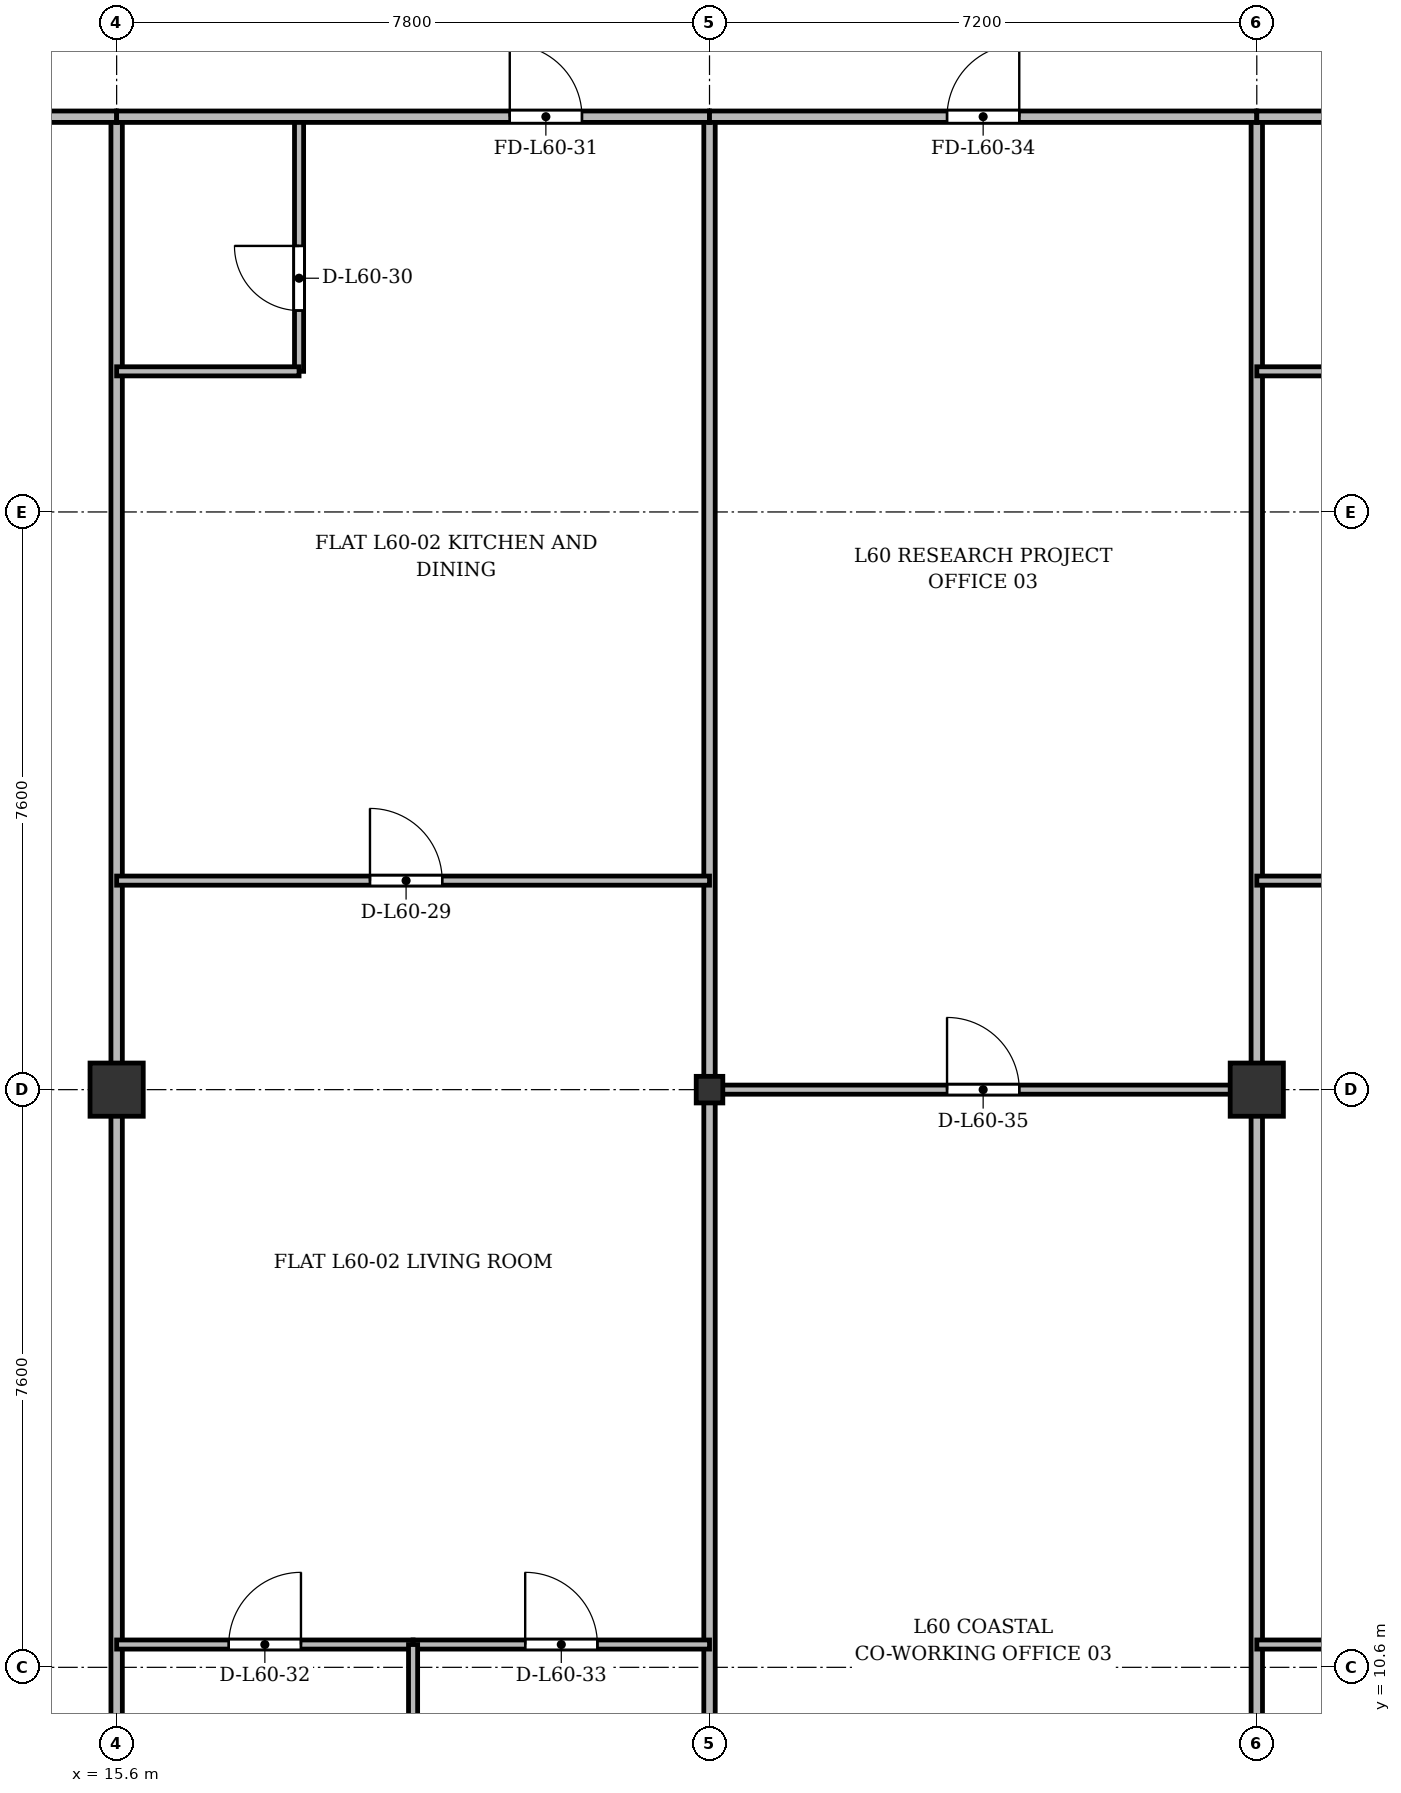
"""IFC4 building model, lengths in metres.
Left out: names, types, materials, properties, quantities, classifications, styles, units other than length and angle.
Written with IfcOpenShell. Run it as: python <this file> out.ifc"""

import sys

from ifc_helpers import new_model, si_unit, direction, frame, frame_2d, origin, origin_2d, place, context, subcontext, project, spatial, rectangle, i_section, extrude, source, transform, mapped, element, fill, save


model = new_model("IFC4")
c1 = context("Model", 3, precision=1e-05, world=origin(), true_north=direction((0.0, 1.0)))
c2 = subcontext(c1, "Body", "Model", "MODEL_VIEW")
j1 = project(units=[si_unit("LENGTHUNIT", "METRE"), si_unit("PLANEANGLEUNIT", "RADIAN")], contexts=[c1])
p1 = place(None, origin())
s1 = spatial("IfcSite", under=j1, at=p1, CompositionType="ELEMENT")
p2 = place(p1, origin())
s2 = spatial("IfcBuilding", under=s1, at=p2, CompositionType="ELEMENT")
p3 = place(p2, frame((0.0, 0.0, 230.1)))
s3 = spatial("IfcBuildingStorey", under=s2, at=p3, CompositionType="ELEMENT", Elevation=230.1)
m1 = source(origin(), c2, "Body", "SweptSolid", [
    extrude(rectangle(XDim=0.7, YDim=0.7, at=origin_2d()), origin(), (0.0, 0.0, 1.0), 3.6),
])
p4 = place(p3, frame((15.6, 18.2, 0.0), z_axis=(0.0, 0.0, 1.0), x_axis=(1.0, 0.0, 0.0)))
e1 = element("IfcColumn", 1, at=p4, inside=s3, PredefinedType="COLUMN", context=c2, shape_type="MappedRepresentation", body=[
    mapped(m1, transform((0.0, 0.0, 0.0), x_axis=(1.0, 0.0, 0.0), y_axis=(0.0, 1.0, 0.0), z_axis=(0.0, 0.0, 1.0), scale=1.0)),
])
m2 = source(origin(), c2, "Body", "SweptSolid", [
    extrude(i_section(OverallWidth=0.35, OverallDepth=0.35, WebThickness=0.018, FlangeThickness=0.028, at=origin_2d()), origin(), (0.0, 0.0, 1.0), 3.6),
])
p5 = place(p3, frame((23.4, 18.2, 0.0), z_axis=(0.0, 0.0, 1.0), x_axis=(1.0, 0.0, 0.0)))
e2 = element("IfcColumn", 2, at=p5, inside=s3, PredefinedType="COLUMN", context=c2, shape_type="MappedRepresentation", body=[
    mapped(m2, transform((0.0, 0.0, 0.0), x_axis=(1.0, 0.0, 0.0), y_axis=(0.0, 1.0, 0.0), z_axis=(0.0, 0.0, 1.0), scale=1.0)),
])
p6 = place(p3, frame((30.6, 18.2, 0.0), z_axis=(0.0, 0.0, 1.0), x_axis=(1.0, 0.0, 0.0)))
e3 = element("IfcColumn", 3, at=p6, inside=s3, PredefinedType="COLUMN", context=c2, shape_type="MappedRepresentation", body=[
    mapped(m1, transform((0.0, 0.0, 0.0), x_axis=(1.0, 0.0, 0.0), y_axis=(0.0, 1.0, 0.0), z_axis=(0.0, 0.0, 1.0), scale=1.0)),
])
for number, where, z_axis, x_axis in (
    (4, (15.6, 3.625, 0.0), (0.0, 0.0, 1.0), (0.0, 1.0, 0.0)),
    (5, (23.4, 3.625, 0.0), (0.0, 0.0, 1.0), (0.0, 1.0, 0.0)),
    (6, (30.6, 3.625, 0.0), (0.0, 0.0, 1.0), (0.0, 1.0, 0.0)),
):
    element("IfcWall", number, at=place(p3, frame(where, z_axis=z_axis, x_axis=x_axis)), inside=s3, PredefinedType="PARTITIONING", context=c2, shape_type="SweptSolid", body=[
        extrude(rectangle(XDim=27.375, YDim=0.15, at=frame_2d((13.688, 0.0))), origin(), (0.0, 0.0, 1.0), 2.86),
    ])
p7 = place(p3, frame((8.225, 31.0, 0.0), z_axis=(0.0, 0.0, 1.0), x_axis=(1.0, 0.0, 0.0)))
e7 = element("IfcWall", 7, at=p7, inside=s3, PredefinedType="PARTITIONING", context=c2, shape_type="SweptSolid", body=[
    extrude(rectangle(XDim=7.375, YDim=0.15, at=frame_2d((3.688, 0.0))), origin(), (0.0, 0.0, 1.0), 2.86),
])
p8 = place(p7, frame((2.795, 0.0, 0.0)))
e8 = element("IfcOpeningElement", 8, at=p8, cuts=e7, PredefinedType="OPENING", context=c2, shape_type="SweptSolid", body=[
    extrude(rectangle(XDim=1.6, YDim=2.2, at=frame_2d((0.8, 1.1))), frame((0.0, 0.085, 0.0), z_axis=(0.0, -1.0, 0.0), x_axis=(1.0, 0.0, 0.0)), (0.0, 0.0, 1.0), 0.17),
])
p9 = place(p3, frame((15.6, 20.95, 0.0), z_axis=(0.0, 0.0, 1.0), x_axis=(1.0, 0.0, 0.0)))
e9 = element("IfcWall", 9, at=p9, inside=s3, PredefinedType="PARTITIONING", context=c2, shape_type="SweptSolid", body=[
    extrude(rectangle(XDim=7.8, YDim=0.12, at=frame_2d((3.9, 0.0))), origin(), (0.0, 0.0, 1.0), 2.86),
])
p10 = place(p9, frame((3.333, 0.0, 0.0)))
e10 = element("IfcOpeningElement", 10, at=p10, cuts=e9, PredefinedType="OPENING", context=c2, shape_type="SweptSolid", body=[
    extrude(rectangle(XDim=0.95, YDim=2.15, at=frame_2d((0.475, 1.075))), frame((0.0, 0.07, 0.0), z_axis=(0.0, -1.0, 0.0), x_axis=(1.0, 0.0, 0.0)), (0.0, 0.0, 1.0), 0.14),
])
p11 = place(p3, frame((18.0, 27.65, 0.0), z_axis=(0.0, 0.0, 1.0), x_axis=(0.0, 1.0, 0.0)))
e11 = element("IfcWall", 11, at=p11, inside=s3, PredefinedType="PARTITIONING", context=c2, shape_type="SweptSolid", body=[
    extrude(rectangle(XDim=3.35, YDim=0.12, at=frame_2d((1.675, 0.0))), origin(), (0.0, 0.0, 1.0), 3.36),
])
p12 = place(p11, frame((0.8, 0.0, 0.0)))
e12 = element("IfcOpeningElement", 12, at=p12, cuts=e11, PredefinedType="OPENING", context=c2, shape_type="SweptSolid", body=[
    extrude(rectangle(XDim=0.85, YDim=2.1, at=frame_2d((0.425, 1.05))), frame((0.0, 0.07, 0.0), z_axis=(0.0, -1.0, 0.0), x_axis=(1.0, 0.0, 0.0)), (0.0, 0.0, 1.0), 0.14),
])
p13 = place(p3, frame((15.6, 27.65, 0.0), z_axis=(0.0, 0.0, 1.0), x_axis=(1.0, 0.0, 0.0)))
e13 = element("IfcWall", 13, at=p13, inside=s3, PredefinedType="PARTITIONING", context=c2, shape_type="SweptSolid", body=[
    extrude(rectangle(XDim=2.4, YDim=0.12, at=frame_2d((1.2, 0.0))), origin(), (0.0, 0.0, 1.0), 2.86),
])
p14 = place(p3, frame((15.6, 31.0, 0.0), z_axis=(0.0, 0.0, 1.0), x_axis=(1.0, 0.0, 0.0)))
e14 = element("IfcWall", 14, at=p14, inside=s3, PredefinedType="PARTITIONING", context=c2, shape_type="SweptSolid", body=[
    extrude(rectangle(XDim=7.8, YDim=0.15, at=frame_2d((3.9, 0.0))), origin(), (0.0, 0.0, 1.0), 2.86),
])
p15 = place(p14, frame((5.172, 0.0, 0.0)))
e15 = element("IfcOpeningElement", 15, at=p15, cuts=e14, PredefinedType="OPENING", context=c2, shape_type="SweptSolid", body=[
    extrude(rectangle(XDim=0.95, YDim=2.15, at=frame_2d((0.475, 1.075))), frame((0.0, 0.085, 0.0), z_axis=(0.0, -1.0, 0.0), x_axis=(1.0, 0.0, 0.0)), (0.0, 0.0, 1.0), 0.17),
])
p16 = place(p3, frame((15.6, 10.9, 0.0), z_axis=(0.0, 0.0, 1.0), x_axis=(1.0, 0.0, 0.0)))
e16 = element("IfcWall", 16, at=p16, inside=s3, PredefinedType="PARTITIONING", context=c2, shape_type="SweptSolid", body=[
    extrude(rectangle(XDim=3.9, YDim=0.12, at=frame_2d((1.95, 0.0))), origin(), (0.0, 0.0, 1.0), 2.86),
])
p17 = place(p16, frame((1.475, 0.0, 0.0)))
e17 = element("IfcOpeningElement", 17, at=p17, cuts=e16, PredefinedType="OPENING", context=c2, shape_type="SweptSolid", body=[
    extrude(rectangle(XDim=0.95, YDim=2.15, at=frame_2d((0.475, 1.075))), frame((0.0, 0.07, 0.0), z_axis=(0.0, -1.0, 0.0), x_axis=(1.0, 0.0, 0.0)), (0.0, 0.0, 1.0), 0.14),
])
p18 = place(p3, frame((19.5, 10.9, 0.0), z_axis=(0.0, 0.0, 1.0), x_axis=(1.0, 0.0, 0.0)))
e18 = element("IfcWall", 18, at=p18, inside=s3, PredefinedType="PARTITIONING", context=c2, shape_type="SweptSolid", body=[
    extrude(rectangle(XDim=3.9, YDim=0.12, at=frame_2d((1.95, 0.0))), origin(), (0.0, 0.0, 1.0), 2.86),
])
p19 = place(p18, frame((1.475, 0.0, 0.0)))
e19 = element("IfcOpeningElement", 19, at=p19, cuts=e18, PredefinedType="OPENING", context=c2, shape_type="SweptSolid", body=[
    extrude(rectangle(XDim=0.95, YDim=2.15, at=frame_2d((0.475, 1.075))), frame((0.0, 0.07, 0.0), z_axis=(0.0, -1.0, 0.0), x_axis=(1.0, 0.0, 0.0)), (0.0, 0.0, 1.0), 0.14),
])
p20 = place(p3, frame((19.5, 3.625, 0.0), z_axis=(0.0, 0.0, 1.0), x_axis=(0.0, 1.0, 0.0)))
e20 = element("IfcWall", 20, at=p20, inside=s3, PredefinedType="PARTITIONING", context=c2, shape_type="SweptSolid", body=[
    extrude(rectangle(XDim=7.275, YDim=0.12, at=frame_2d((3.637, 0.0))), origin(), (0.0, 0.0, 1.0), 2.91),
])
p21 = place(p3, frame((23.4, 31.0, 0.0), z_axis=(0.0, 0.0, 1.0), x_axis=(1.0, 0.0, 0.0)))
e21 = element("IfcWall", 21, at=p21, inside=s3, PredefinedType="PARTITIONING", context=c2, shape_type="SweptSolid", body=[
    extrude(rectangle(XDim=7.2, YDim=0.15, at=frame_2d((3.6, 0.0))), origin(), (0.0, 0.0, 1.0), 2.86),
])
p22 = place(p21, frame((3.125, 0.0, 0.0)))
e22 = element("IfcOpeningElement", 22, at=p22, cuts=e21, PredefinedType="OPENING", context=c2, shape_type="SweptSolid", body=[
    extrude(rectangle(XDim=0.95, YDim=2.15, at=frame_2d((0.475, 1.075))), frame((0.0, 0.085, 0.0), z_axis=(0.0, -1.0, 0.0), x_axis=(1.0, 0.0, 0.0)), (0.0, 0.0, 1.0), 0.17),
])
p23 = place(p3, frame((23.4, 18.2, 0.0), z_axis=(0.0, 0.0, 1.0), x_axis=(1.0, 0.0, 0.0)))
e23 = element("IfcWall", 23, at=p23, inside=s3, PredefinedType="PARTITIONING", context=c2, shape_type="SweptSolid", body=[
    extrude(rectangle(XDim=7.2, YDim=0.12, at=frame_2d((3.6, 0.0))), origin(), (0.0, 0.0, 1.0), 2.91),
])
p24 = place(p23, frame((3.125, 0.0, 0.0)))
e24 = element("IfcOpeningElement", 24, at=p24, cuts=e23, PredefinedType="OPENING", context=c2, shape_type="SweptSolid", body=[
    extrude(rectangle(XDim=0.95, YDim=2.15, at=frame_2d((0.475, 1.075))), frame((0.0, 0.07, 0.0), z_axis=(0.0, -1.0, 0.0), x_axis=(1.0, 0.0, 0.0)), (0.0, 0.0, 1.0), 0.14),
])
p25 = place(p3, frame((30.6, 20.95, 0.0), z_axis=(0.0, 0.0, 1.0), x_axis=(1.0, 0.0, 0.0)))
e25 = element("IfcWall", 25, at=p25, inside=s3, PredefinedType="PARTITIONING", context=c2, shape_type="SweptSolid", body=[
    extrude(rectangle(XDim=8.6, YDim=0.12, at=frame_2d((4.3, 0.0))), origin(), (0.0, 0.0, 1.0), 2.86),
])
p26 = place(p25, frame((3.825, 0.0, 0.0)))
e26 = element("IfcOpeningElement", 26, at=p26, cuts=e25, PredefinedType="OPENING", context=c2, shape_type="SweptSolid", body=[
    extrude(rectangle(XDim=0.95, YDim=2.15, at=frame_2d((0.475, 1.075))), frame((0.0, 0.07, 0.0), z_axis=(0.0, -1.0, 0.0), x_axis=(1.0, 0.0, 0.0)), (0.0, 0.0, 1.0), 0.14),
])
p27 = place(p3, frame((30.6, 27.65, 0.0), z_axis=(0.0, 0.0, 1.0), x_axis=(1.0, 0.0, 0.0)))
e27 = element("IfcWall", 27, at=p27, inside=s3, PredefinedType="PARTITIONING", context=c2, shape_type="SweptSolid", body=[
    extrude(rectangle(XDim=2.4, YDim=0.12, at=frame_2d((1.2, 0.0))), origin(), (0.0, 0.0, 1.0), 2.86),
])
p28 = place(p3, frame((30.6, 31.0, 0.0), z_axis=(0.0, 0.0, 1.0), x_axis=(1.0, 0.0, 0.0)))
e28 = element("IfcWall", 28, at=p28, inside=s3, PredefinedType="PARTITIONING", context=c2, shape_type="SweptSolid", body=[
    extrude(rectangle(XDim=8.6, YDim=0.15, at=frame_2d((4.3, 0.0))), origin(), (0.0, 0.0, 1.0), 2.86),
])
p29 = place(p28, frame((5.767, 0.0, 0.0)))
e29 = element("IfcOpeningElement", 29, at=p29, cuts=e28, PredefinedType="OPENING", context=c2, shape_type="SweptSolid", body=[
    extrude(rectangle(XDim=0.95, YDim=2.15, at=frame_2d((0.475, 1.075))), frame((0.0, 0.085, 0.0), z_axis=(0.0, -1.0, 0.0), x_axis=(1.0, 0.0, 0.0)), (0.0, 0.0, 1.0), 0.17),
])
p30 = place(p3, frame((30.6, 10.9, 0.0), z_axis=(0.0, 0.0, 1.0), x_axis=(1.0, 0.0, 0.0)))
e30 = element("IfcWall", 30, at=p30, inside=s3, PredefinedType="PARTITIONING", context=c2, shape_type="SweptSolid", body=[
    extrude(rectangle(XDim=2.867, YDim=0.12, at=frame_2d((1.434, 0.0))), origin(), (0.0, 0.0, 1.0), 2.86),
])
p31 = place(p30, frame((0.958, 0.0, 0.0)))
e31 = element("IfcOpeningElement", 31, at=p31, cuts=e30, PredefinedType="OPENING", context=c2, shape_type="SweptSolid", body=[
    extrude(rectangle(XDim=0.95, YDim=2.15, at=frame_2d((0.475, 1.075))), frame((0.0, 0.07, 0.0), z_axis=(0.0, -1.0, 0.0), x_axis=(1.0, 0.0, 0.0)), (0.0, 0.0, 1.0), 0.14),
])
m3 = source(origin(), c2, "Body", "SweptSolid", [
    extrude(rectangle(XDim=0.95, YDim=2.15, at=frame_2d((0.475, 1.075))), frame((0.0, 0.025, 0.0), z_axis=(0.0, -1.0, 0.0), x_axis=(1.0, 0.0, 0.0)), (0.0, 0.0, 1.0), 0.05),
])
p32 = place(p10, origin())
e32 = element("IfcDoor", 32, at=p32, inside=s3, OperationType="SINGLE_SWING_LEFT", PredefinedType="DOOR", context=c2, shape_type="MappedRepresentation", body=[
    mapped(m3, transform((0.0, 0.0, 0.0), x_axis=(1.0, 0.0, 0.0), y_axis=(0.0, 1.0, 0.0), z_axis=(0.0, 0.0, 1.0), scale=1.0)),
])
fill(e10, e32)
m4 = source(origin(), c2, "Body", "SweptSolid", [
    extrude(rectangle(XDim=0.85, YDim=2.1, at=frame_2d((0.425, 1.05))), frame((0.0, 0.025, 0.0), z_axis=(0.0, -1.0, 0.0), x_axis=(1.0, 0.0, 0.0)), (0.0, 0.0, 1.0), 0.05),
])
p33 = place(p12, origin())
e33 = element("IfcDoor", 33, at=p33, inside=s3, OperationType="SINGLE_SWING_RIGHT", PredefinedType="DOOR", context=c2, shape_type="MappedRepresentation", body=[
    mapped(m4, transform((0.0, 0.0, 0.0), x_axis=(1.0, 0.0, 0.0), y_axis=(0.0, 1.0, 0.0), z_axis=(0.0, 0.0, 1.0), scale=1.0)),
])
fill(e12, e33)
p34 = place(p15, origin())
e34 = element("IfcDoor", 34, at=p34, inside=s3, OperationType="SINGLE_SWING_LEFT", PredefinedType="DOOR", context=c2, shape_type="MappedRepresentation", body=[
    mapped(m3, transform((0.0, 0.0, 0.0), x_axis=(1.0, 0.0, 0.0), y_axis=(0.0, 1.0, 0.0), z_axis=(0.0, 0.0, 1.0), scale=1.0)),
])
fill(e15, e34)
p35 = place(p17, origin())
e35 = element("IfcDoor", 35, at=p35, inside=s3, OperationType="SINGLE_SWING_RIGHT", PredefinedType="DOOR", context=c2, shape_type="MappedRepresentation", body=[
    mapped(m3, transform((0.0, 0.0, 0.0), x_axis=(1.0, 0.0, 0.0), y_axis=(0.0, 1.0, 0.0), z_axis=(0.0, 0.0, 1.0), scale=1.0)),
])
fill(e17, e35)
p36 = place(p19, origin())
e36 = element("IfcDoor", 36, at=p36, inside=s3, OperationType="SINGLE_SWING_LEFT", PredefinedType="DOOR", context=c2, shape_type="MappedRepresentation", body=[
    mapped(m3, transform((0.0, 0.0, 0.0), x_axis=(1.0, 0.0, 0.0), y_axis=(0.0, 1.0, 0.0), z_axis=(0.0, 0.0, 1.0), scale=1.0)),
])
fill(e19, e36)
p37 = place(p22, origin())
e37 = element("IfcDoor", 37, at=p37, inside=s3, OperationType="SINGLE_SWING_RIGHT", PredefinedType="DOOR", context=c2, shape_type="MappedRepresentation", body=[
    mapped(m3, transform((0.0, 0.0, 0.0), x_axis=(1.0, 0.0, 0.0), y_axis=(0.0, 1.0, 0.0), z_axis=(0.0, 0.0, 1.0), scale=1.0)),
])
fill(e22, e37)
p38 = place(p24, origin())
e38 = element("IfcDoor", 38, at=p38, inside=s3, OperationType="SINGLE_SWING_LEFT", PredefinedType="DOOR", context=c2, shape_type="MappedRepresentation", body=[
    mapped(m3, transform((0.0, 0.0, 0.0), x_axis=(1.0, 0.0, 0.0), y_axis=(0.0, 1.0, 0.0), z_axis=(0.0, 0.0, 1.0), scale=1.0)),
])
fill(e24, e38)
save(model, sys.argv[1])
